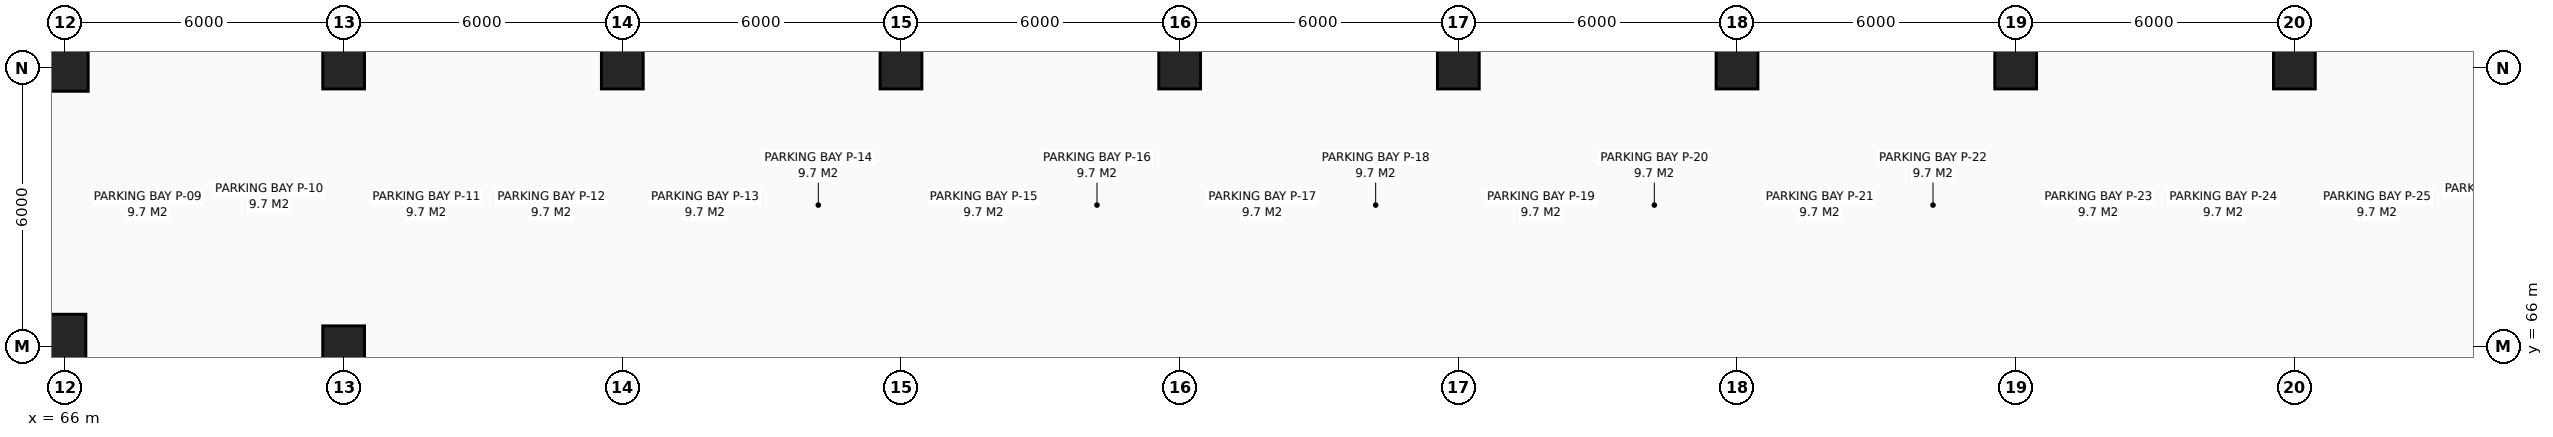
"""IFC4 building model, lengths in metres.
Left out: names, types, materials, properties, quantities, classifications, styles, units other than length and angle.
Written with IfcOpenShell. Run it as: python <this file> out.ifc"""

import sys

from ifc_helpers import new_model, si_unit, direction, frame, origin, origin_2d, place, context, subcontext, project, spatial, rectangle, extrude, element, save


model = new_model("IFC4")
c1 = context("Model", 3, precision=1e-05, world=origin(), true_north=direction((0.0, 1.0)))
c2 = subcontext(c1, "Body", "Model", "MODEL_VIEW")
j1 = project(units=[si_unit("LENGTHUNIT", "METRE"), si_unit("PLANEANGLEUNIT", "RADIAN")], contexts=[c1])
p1 = place(None, origin())
s1 = spatial("IfcSite", under=j1, at=p1, CompositionType="ELEMENT")
p2 = place(p1, origin())
s2 = spatial("IfcBuilding", under=s1, at=p2, CompositionType="ELEMENT")
p3 = place(p2, frame((0.0, 0.0, -4.8)))
s3 = spatial("IfcBuildingStorey", under=s2, at=p3, CompositionType="ELEMENT", Elevation=-4.8)
p4 = place(p3, frame((66.0, 66.0, 0.0), z_axis=(0.0, 0.0, 1.0), x_axis=(1.0, 0.0, 0.0)))
e1 = element("IfcColumn", 1, at=p4, inside=s3, PredefinedType="COLUMN", context=c2, shape_type="SweptSolid", body=[
    extrude(rectangle(XDim=0.9, YDim=1.4, at=origin_2d()), origin(), (0.0, 0.0, 1.0), 4.8),
])
p5 = place(p3, frame((66.0, 72.0, 0.0), z_axis=(0.0, 0.0, 1.0), x_axis=(1.0, 0.0, 0.0)))
e2 = element("IfcColumn", 2, at=p5, inside=s3, PredefinedType="COLUMN", context=c2, shape_type="SweptSolid", body=[
    extrude(rectangle(XDim=1.0, YDim=1.0, at=origin_2d()), origin(), (0.0, 0.0, 1.0), 4.8),
])
for number, where, z_axis, x_axis in (
    (3, (72.0, 66.0, 0.0), (0.0, 0.0, 1.0), (1.0, 0.0, 0.0)),
    (4, (72.0, 72.0, 0.0), (0.0, 0.0, 1.0), (1.0, 0.0, 0.0)),
    (5, (78.0, 72.0, 0.0), (0.0, 0.0, 1.0), (1.0, 0.0, 0.0)),
    (6, (84.0, 72.0, 0.0), (0.0, 0.0, 1.0), (1.0, 0.0, 0.0)),
    (7, (90.0, 72.0, 0.0), (0.0, 0.0, 1.0), (1.0, 0.0, 0.0)),
    (8, (96.0, 72.0, 0.0), (0.0, 0.0, 1.0), (1.0, 0.0, 0.0)),
    (9, (102.0, 72.0, 0.0), (0.0, 0.0, 1.0), (1.0, 0.0, 0.0)),
    (10, (108.0, 72.0, 0.0), (0.0, 0.0, 1.0), (1.0, 0.0, 0.0)),
    (11, (114.0, 72.0, 0.0), (0.0, 0.0, 1.0), (1.0, 0.0, 0.0)),
):
    element("IfcColumn", number, at=place(p3, frame(where, z_axis=z_axis, x_axis=x_axis)), inside=s3, PredefinedType="COLUMN", context=c2, shape_type="SweptSolid", body=[
        extrude(rectangle(XDim=0.9, YDim=0.9, at=origin_2d()), origin(), (0.0, 0.0, 1.0), 4.8),
    ])
save(model, sys.argv[1])
